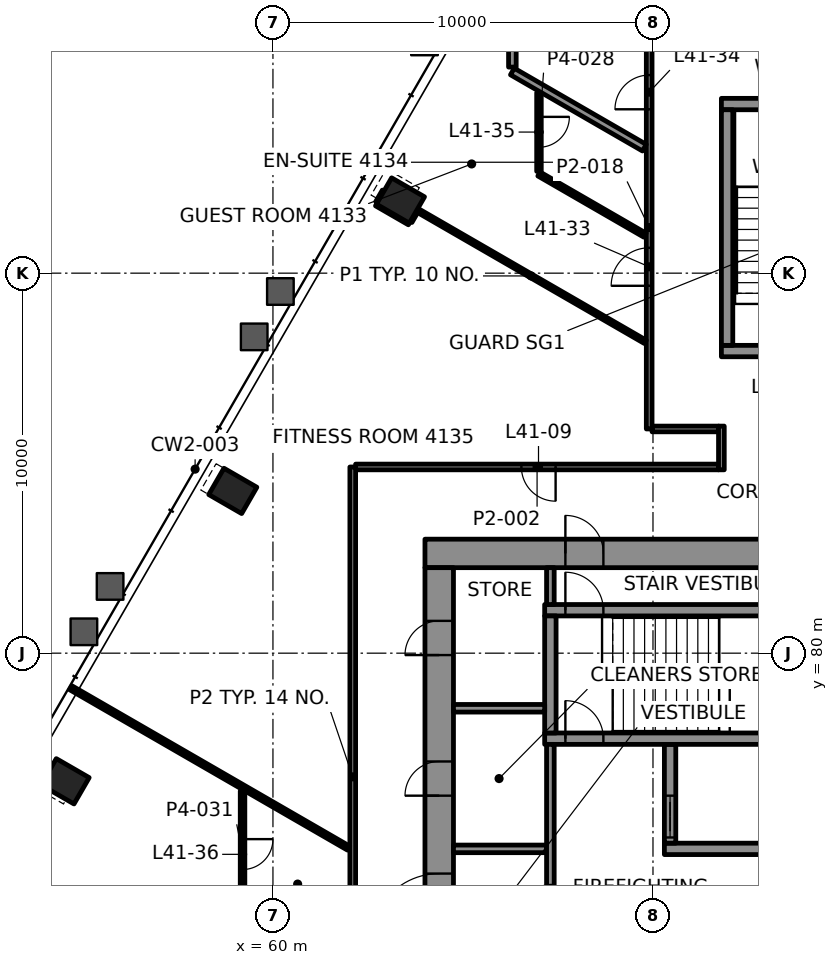
"""IFC4 building model, lengths in metres.
Left out: names, types, materials, properties, quantities, classifications, styles, units other than length and angle.
Written with IfcOpenShell. Run it as: python <this file> out.ifc"""

import sys

from ifc_helpers import new_model, si_unit, direction, frame, frame_2d, origin, origin_2d, place, context, subcontext, project, spatial, rectangle, hollow_rectangle, extrude, element, fill, save


model = new_model("IFC4")
c1 = context("Model", 3, precision=1e-05, world=origin(), true_north=direction((0.0, 1.0)))
c2 = subcontext(c1, "Body", "Model", "MODEL_VIEW")
j1 = project(units=[si_unit("LENGTHUNIT", "METRE"), si_unit("PLANEANGLEUNIT", "RADIAN")], contexts=[c1])
p1 = place(None, origin())
s1 = spatial("IfcSite", under=j1, at=p1, CompositionType="ELEMENT")
p2 = place(p1, origin())
s2 = spatial("IfcBuilding", under=s1, at=p2, CompositionType="ELEMENT")
p3 = place(p2, frame((0.0, 0.0, 179.2)))
s3 = spatial("IfcBuildingStorey", under=s2, at=p3, CompositionType="ELEMENT", Elevation=179.2)
for number, where, z_axis, x_axis in (
    (1, (63.355, 91.912, -0.0), (0.0, 0.0, 1.0), (-0.5, -0.866, 0.0)),
    (2, (58.944, 84.27, -0.0), (0.0, 0.0, 1.0), (-0.5, -0.866, 0.0)),
    (3, (54.532, 76.628, -0.0), (0.0, 0.0, 1.0), (-0.5, -0.866, 0.0)),
):
    element("IfcColumn", number, at=place(p3, frame(where, z_axis=z_axis, x_axis=x_axis)), inside=s3, PredefinedType="COLUMN", context=c2, shape_type="SweptSolid", body=[
        extrude(hollow_rectangle(XDim=0.8, YDim=1.0, WallThickness=0.05, at=origin_2d()), origin(), (0.0, 0.0, 1.0), 3.9),
    ])
p4 = place(p3, frame((64.0, 82.625, 0.0), z_axis=(0.0, 0.0, 1.0), x_axis=(1.0, 0.0, 0.0)))
e4 = element("IfcWall", 4, at=p4, inside=s3, PredefinedType="SHEAR", context=c2, shape_type="SweptSolid", body=[
    extrude(rectangle(XDim=22.0, YDim=0.75, at=frame_2d((11.0, 0.0))), origin(), (0.0, 0.0, 1.0), 3.7),
])
p5 = place(p4, frame((3.695, 0.0, 0.0)))
e5 = element("IfcOpeningElement", 5, at=p5, cuts=e4, PredefinedType="OPENING", context=c2, shape_type="SweptSolid", body=[
    extrude(rectangle(XDim=1.0, YDim=2.1, at=frame_2d((0.5, 1.05))), frame((0.0, 0.385, 0.0), z_axis=(0.0, -1.0, 0.0), x_axis=(1.0, 0.0, 0.0)), (0.0, 0.0, 1.0), 0.77),
])
p6 = place(p4, frame((17.505, 0.0, 0.0)))
e6 = element("IfcOpeningElement", 6, at=p6, cuts=e4, PredefinedType="OPENING", context=c2, shape_type="SweptSolid", body=[
    extrude(rectangle(XDim=1.0, YDim=2.1, at=frame_2d((0.5, 1.05))), frame((0.0, 0.385, 0.0), z_axis=(0.0, -1.0, 0.0), x_axis=(1.0, 0.0, 0.0)), (0.0, 0.0, 1.0), 0.77),
])
p7 = place(p4, frame((10.65, 0.0, 0.0)))
e7 = element("IfcOpeningElement", 7, at=p7, cuts=e4, PredefinedType="OPENING", context=c2, shape_type="SweptSolid", body=[
    extrude(rectangle(XDim=0.9, YDim=2.1, at=frame_2d((0.45, 1.05))), frame((0.0, 0.385, 0.0), z_axis=(0.0, -1.0, 0.0), x_axis=(1.0, 0.0, 0.0)), (0.0, 0.0, 1.0), 0.77),
])
p8 = place(p3, frame((64.375, 67.75, 0.0), z_axis=(0.0, 0.0, 1.0), x_axis=(0.0, 1.0, 0.0)))
e8 = element("IfcWall", 8, at=p8, inside=s3, PredefinedType="SHEAR", context=c2, shape_type="SweptSolid", body=[
    extrude(rectangle(XDim=14.5, YDim=0.75, at=frame_2d((7.25, 0.0))), origin(), (0.0, 0.0, 1.0), 3.7),
])
p9 = place(p8, frame((4.65, 0.0, 0.0)))
e9 = element("IfcOpeningElement", 9, at=p9, cuts=e8, PredefinedType="OPENING", context=c2, shape_type="SweptSolid", body=[
    extrude(rectangle(XDim=1.8, YDim=2.1, at=frame_2d((0.9, 1.05))), frame((0.0, 0.385, 0.0), z_axis=(0.0, -1.0, 0.0), x_axis=(1.0, 0.0, 0.0)), (0.0, 0.0, 1.0), 0.77),
])
p10 = place(p8, frame((8.5, 0.0, 0.0)))
e10 = element("IfcOpeningElement", 10, at=p10, cuts=e8, PredefinedType="OPENING", context=c2, shape_type="SweptSolid", body=[
    extrude(rectangle(XDim=0.9, YDim=2.1, at=frame_2d((0.45, 1.05))), frame((0.0, 0.385, 0.0), z_axis=(0.0, -1.0, 0.0), x_axis=(1.0, 0.0, 0.0)), (0.0, 0.0, 1.0), 0.77),
])
p11 = place(p8, frame((12.2, 0.0, 0.0)))
e11 = element("IfcOpeningElement", 11, at=p11, cuts=e8, PredefinedType="OPENING", context=c2, shape_type="SweptSolid", body=[
    extrude(rectangle(XDim=0.9, YDim=2.1, at=frame_2d((0.45, 1.05))), frame((0.0, 0.385, 0.0), z_axis=(0.0, -1.0, 0.0), x_axis=(1.0, 0.0, 0.0)), (0.0, 0.0, 1.0), 0.77),
])
p12 = place(p3, frame((70.3, 74.85, 0.0), z_axis=(0.0, 0.0, 1.0), x_axis=(1.0, 0.0, 0.0)))
e12 = element("IfcWall", 12, at=p12, inside=s3, PredefinedType="SHEAR", context=c2, shape_type="SweptSolid", body=[
    extrude(rectangle(XDim=14.3, YDim=0.3, at=frame_2d((7.15, 0.0))), origin(), (0.0, 0.0, 1.0), 3.7),
])
p13 = place(p12, frame((3.8, 0.0, 0.0)))
e13 = element("IfcOpeningElement", 13, at=p13, cuts=e12, PredefinedType="OPENING", context=c2, shape_type="SweptSolid", body=[
    extrude(rectangle(XDim=1.1, YDim=2.1, at=frame_2d((0.55, 1.05))), frame((0.0, 0.16, 0.0), z_axis=(0.0, -1.0, 0.0), x_axis=(1.0, 0.0, 0.0)), (0.0, 0.0, 1.0), 0.32),
])
p14 = place(p12, frame((12.2, 0.0, 0.0)))
e14 = element("IfcOpeningElement", 14, at=p14, cuts=e12, PredefinedType="OPENING", context=c2, shape_type="SweptSolid", body=[
    extrude(rectangle(XDim=1.1, YDim=2.1, at=frame_2d((0.55, 1.05))), frame((0.0, 0.16, 0.0), z_axis=(0.0, -1.0, 0.0), x_axis=(1.0, 0.0, 0.0)), (0.0, 0.0, 1.0), 0.32),
])
p15 = place(p3, frame((70.45, 75.0, 0.0), z_axis=(0.0, 0.0, 1.0), x_axis=(0.0, 1.0, 0.0)))
e15 = element("IfcWall", 15, at=p15, inside=s3, PredefinedType="SHEAR", context=c2, shape_type="SweptSolid", body=[
    extrude(rectangle(XDim=2.6, YDim=0.3, at=frame_2d((1.3, 0.0))), origin(), (0.0, 0.0, 1.0), 3.7),
])
p16 = place(p15, frame((0.15, 0.0, 0.0)))
e16 = element("IfcOpeningElement", 16, at=p16, cuts=e15, PredefinedType="OPENING", context=c2, shape_type="SweptSolid", body=[
    extrude(rectangle(XDim=1.1, YDim=2.1, at=frame_2d((0.55, 1.05))), frame((0.0, 0.16, 0.0), z_axis=(0.0, -1.0, 0.0), x_axis=(1.0, 0.0, 0.0)), (0.0, 0.0, 1.0), 0.32),
])
p17 = place(p3, frame((67.15, 77.75, 0.0), z_axis=(0.0, 0.0, 1.0), x_axis=(1.0, 0.0, 0.0)))
e17 = element("IfcWall", 17, at=p17, inside=s3, PredefinedType="SHEAR", context=c2, shape_type="SweptSolid", body=[
    extrude(rectangle(XDim=17.45, YDim=0.3, at=frame_2d((8.725, 0.0))), origin(), (0.0, 0.0, 1.0), 3.7),
])
p18 = place(p17, frame((0.545, 0.0, 0.0)))
e18 = element("IfcOpeningElement", 18, at=p18, cuts=e17, PredefinedType="OPENING", context=c2, shape_type="SweptSolid", body=[
    extrude(rectangle(XDim=1.0, YDim=2.1, at=frame_2d((0.5, 1.05))), frame((0.0, 0.16, 0.0), z_axis=(0.0, -1.0, 0.0), x_axis=(1.0, 0.0, 0.0)), (0.0, 0.0, 1.0), 0.32),
])
p19 = place(p3, frame((67.15, 81.13, 0.0), z_axis=(0.0, 0.0, 1.0), x_axis=(1.0, 0.0, 0.0)))
e19 = element("IfcWall", 19, at=p19, inside=s3, PredefinedType="SHEAR", context=c2, shape_type="SweptSolid", body=[
    extrude(rectangle(XDim=6.91, YDim=0.3, at=frame_2d((3.455, 0.0))), origin(), (0.0, 0.0, 1.0), 3.7),
])
p20 = place(p19, frame((0.545, 0.0, 0.0)))
e20 = element("IfcOpeningElement", 20, at=p20, cuts=e19, PredefinedType="OPENING", context=c2, shape_type="SweptSolid", body=[
    extrude(rectangle(XDim=1.0, YDim=2.1, at=frame_2d((0.5, 1.05))), frame((0.0, 0.16, 0.0), z_axis=(0.0, -1.0, 0.0), x_axis=(1.0, 0.0, 0.0)), (0.0, 0.0, 1.0), 0.32),
])
p21 = place(p3, frame((67.3, 77.9, 0.0), z_axis=(0.0, 0.0, 1.0), x_axis=(0.0, 1.0, 0.0)))
e21 = element("IfcWall", 21, at=p21, inside=s3, PredefinedType="SHEAR", context=c2, shape_type="SweptSolid", body=[
    extrude(rectangle(XDim=3.08, YDim=0.3, at=frame_2d((1.54, 0.0))), origin(), (0.0, 0.0, 1.0), 3.7),
])
p22 = place(p3, frame((71.8, 87.95, 0.0), z_axis=(0.0, 0.0, 1.0), x_axis=(1.0, 0.0, 0.0)))
e22 = element("IfcWall", 22, at=p22, inside=s3, PredefinedType="SHEAR", context=c2, shape_type="SweptSolid", body=[
    extrude(rectangle(XDim=6.4, YDim=0.3, at=frame_2d((3.2, 0.0))), origin(), (0.0, 0.0, 1.0), 3.7),
])
p23 = place(p22, frame((1.325, 0.0, 0.0)))
e23 = element("IfcOpeningElement", 23, at=p23, cuts=e22, PredefinedType="OPENING", context=c2, shape_type="SweptSolid", body=[
    extrude(rectangle(XDim=1.0, YDim=2.1, at=frame_2d((0.5, 1.05))), frame((0.0, 0.16, 0.0), z_axis=(0.0, -1.0, 0.0), x_axis=(1.0, 0.0, 0.0)), (0.0, 0.0, 1.0), 0.32),
])
p24 = place(p22, frame((4.125, 0.0, 0.0)))
e24 = element("IfcOpeningElement", 24, at=p24, cuts=e22, PredefinedType="OPENING", context=c2, shape_type="SweptSolid", body=[
    extrude(rectangle(XDim=1.2, YDim=2.1, at=frame_2d((0.6, 1.05))), frame((0.0, 0.16, 0.0), z_axis=(0.0, -1.0, 0.0), x_axis=(1.0, 0.0, 0.0)), (0.0, 0.0, 1.0), 0.32),
])
p25 = place(p3, frame((71.8, 94.45, 0.0), z_axis=(0.0, 0.0, 1.0), x_axis=(1.0, 0.0, 0.0)))
e25 = element("IfcWall", 25, at=p25, inside=s3, PredefinedType="SHEAR", context=c2, shape_type="SweptSolid", body=[
    extrude(rectangle(XDim=6.4, YDim=0.3, at=frame_2d((3.2, 0.0))), origin(), (0.0, 0.0, 1.0), 3.7),
])
p26 = place(p3, frame((71.95, 88.1, 0.0), z_axis=(0.0, 0.0, 1.0), x_axis=(0.0, 1.0, 0.0)))
e26 = element("IfcWall", 26, at=p26, inside=s3, PredefinedType="SHEAR", context=c2, shape_type="SweptSolid", body=[
    extrude(rectangle(XDim=6.2, YDim=0.3, at=frame_2d((3.1, 0.0))), origin(), (0.0, 0.0, 1.0), 3.7),
])
p27 = place(p3, frame((71.725, 84.9, 0.0), z_axis=(0.0, 0.0, 1.0), x_axis=(-1.0, 0.0, 0.0)))
e27 = element("IfcWall", 27, at=p27, inside=s3, PredefinedType="PARTITIONING", context=c2, shape_type="SweptSolid", body=[
    extrude(rectangle(XDim=9.55, YDim=0.15, at=frame_2d((4.775, 0.0))), origin(), (0.0, 0.0, 1.0), 3.1),
])
p28 = place(p27, frame((4.287, 0.0, 0.0)))
e28 = element("IfcOpeningElement", 28, at=p28, cuts=e27, PredefinedType="OPENING", context=c2, shape_type="SweptSolid", body=[
    extrude(rectangle(XDim=0.9, YDim=2.1, at=frame_2d((0.45, 1.05))), frame((0.0, 0.085, 0.0), z_axis=(0.0, -1.0, 0.0), x_axis=(1.0, 0.0, 0.0)), (0.0, 0.0, 1.0), 0.17),
])
p29 = place(p3, frame((69.976, 85.9, 0.0), z_axis=(0.0, 0.0, 1.0), x_axis=(1.0, 0.0, 0.0)))
e29 = element("IfcWall", 29, at=p29, inside=s3, PredefinedType="PARTITIONING", context=c2, shape_type="SweptSolid", body=[
    extrude(rectangle(XDim=1.75, YDim=0.15, at=frame_2d((0.875, 0.0))), origin(), (0.0, 0.0, 1.0), 3.1),
])
p30 = place(p3, frame((63.614, 91.359, 0.0), z_axis=(0.0, 0.0, 1.0), x_axis=(0.499557828523, 0.866280541142, 0.0)))
e30 = element("IfcWall", 30, at=p30, inside=s3, PredefinedType="PARTITIONING", context=c2, shape_type="SweptSolid", body=[
    extrude(rectangle(XDim=0.3, YDim=0.1, at=frame_2d((0.15, 0.0))), origin(), (0.0, 0.0, 1.0), 3.022),
])
p31 = place(p3, frame((62.748, 91.859, 0.0), z_axis=(0.0, 0.0, 1.0), x_axis=(0.500044870432, 0.865999496279, 0.0)))
e31 = element("IfcWall", 31, at=p31, inside=s3, PredefinedType="PARTITIONING", context=c2, shape_type="SweptSolid", body=[
    extrude(rectangle(XDim=0.35, YDim=0.1, at=frame_2d((0.175, 0.0))), origin(), (0.0, 0.0, 1.0), 3.1),
])
p32 = place(p3, frame((71.8, 84.825, 0.0), z_axis=(0.0, 0.0, 1.0), x_axis=(0.0, 1.0, 0.0)))
e32 = element("IfcWall", 32, at=p32, inside=s3, PredefinedType="PARTITIONING", context=c2, shape_type="SweptSolid", body=[
    extrude(rectangle(XDim=1.15, YDim=0.15, at=frame_2d((0.575, 0.0))), origin(), (0.0, 0.0, 1.0), 3.1),
])
p33 = place(p3, frame((69.9, 85.9, 0.0), z_axis=(0.0, 0.0, 1.0), x_axis=(0.0, 1.0, 0.0)))
e33 = element("IfcWall", 33, at=p33, inside=s3, PredefinedType="PARTITIONING", context=c2, shape_type="SweptSolid", body=[
    extrude(rectangle(XDim=10.6, YDim=0.15, at=frame_2d((5.3, 0.0))), origin(), (0.0, 0.0, 1.0), 3.022),
])
p34 = place(p33, frame((3.767, 0.0, 0.0)))
e34 = element("IfcOpeningElement", 34, at=p34, cuts=e33, PredefinedType="OPENING", context=c2, shape_type="SweptSolid", body=[
    extrude(rectangle(XDim=1.0, YDim=2.1, at=frame_2d((0.5, 1.05))), frame((0.0, 0.085, 0.0), z_axis=(0.0, -1.0, 0.0), x_axis=(1.0, 0.0, 0.0)), (0.0, 0.0, 1.0), 0.17),
])
p35 = place(p33, frame((8.412, 0.0, 0.0)))
e35 = element("IfcOpeningElement", 35, at=p35, cuts=e33, PredefinedType="OPENING", context=c2, shape_type="SweptSolid", body=[
    extrude(rectangle(XDim=0.9, YDim=2.1, at=frame_2d((0.45, 1.05))), frame((0.0, 0.085, 0.0), z_axis=(0.0, -1.0, 0.0), x_axis=(1.0, 0.0, 0.0)), (0.0, 0.0, 1.0), 0.17),
])
p36 = place(p3, frame((67.0, 94.747, 0.0), z_axis=(0.0, 0.0, 1.0), x_axis=(0.0, -1.0, 0.0)))
e36 = element("IfcWall", 36, at=p36, inside=s3, PredefinedType="PARTITIONING", context=c2, shape_type="SweptSolid", body=[
    extrude(rectangle(XDim=2.068, YDim=0.12, at=frame_2d((1.034, 0.0))), origin(), (0.0, 0.0, 1.0), 3.1),
])
p37 = place(p36, frame((0.634, 0.0, 0.0)))
e37 = element("IfcOpeningElement", 37, at=p37, cuts=e36, PredefinedType="OPENING", context=c2, shape_type="SweptSolid", body=[
    extrude(rectangle(XDim=0.8, YDim=2.1, at=frame_2d((0.4, 1.05))), frame((0.0, 0.07, 0.0), z_axis=(0.0, -1.0, 0.0), x_axis=(1.0, 0.0, 0.0)), (0.0, 0.0, 1.0), 0.14),
])
p38 = place(p3, frame((66.3, 95.423, 0.0), z_axis=(0.0, 0.0, 1.0), x_axis=(0.0, 1.0, 0.0)))
e38 = element("IfcWall", 38, at=p38, inside=s3, PredefinedType="PARTITIONING", context=c2, shape_type="SweptSolid", body=[
    extrude(rectangle(XDim=3.789, YDim=0.2, at=frame_2d((1.895, 0.0))), origin(), (0.0, 0.0, 1.0), 3.022),
])
p39 = place(p3, frame((62.1, 68.591, 0.0), z_axis=(0.0, 0.0, 1.0), x_axis=(0.0, 1.0, 0.0)))
e39 = element("IfcWall", 39, at=p39, inside=s3, PredefinedType="PARTITIONING", context=c2, shape_type="SweptSolid", body=[
    extrude(rectangle(XDim=16.308, YDim=0.15, at=frame_2d((8.154, 0.0))), origin(), (0.0, 0.0, 1.0), 3.1),
])
p40 = place(p3, frame((59.2, 76.371, 0.0), z_axis=(0.0, 0.0, 1.0), x_axis=(0.0, -1.0, 0.0)))
e40 = element("IfcWall", 40, at=p40, inside=s3, PredefinedType="PARTITIONING", context=c2, shape_type="SweptSolid", body=[
    extrude(rectangle(XDim=3.329, YDim=0.12, at=frame_2d((1.665, 0.0))), origin(), (0.0, 0.0, 1.0), 3.1),
])
p41 = place(p40, frame((1.265, 0.0, 0.0)))
e41 = element("IfcOpeningElement", 41, at=p41, cuts=e40, PredefinedType="OPENING", context=c2, shape_type="SweptSolid", body=[
    extrude(rectangle(XDim=0.8, YDim=2.1, at=frame_2d((0.4, 1.05))), frame((0.0, 0.07, 0.0), z_axis=(0.0, -1.0, 0.0), x_axis=(1.0, 0.0, 0.0)), (0.0, 0.0, 1.0), 0.14),
])
p42 = place(p3, frame((69.773, 93.302, 0.0), z_axis=(0.0, 0.0, 1.0), x_axis=(-0.866046692957, 0.499963124258, 0.0)))
e42 = element("IfcWall", 42, at=p42, inside=s3, PredefinedType="PARTITIONING", context=c2, shape_type="SweptSolid", body=[
    extrude(rectangle(XDim=4.01, YDim=0.2, at=frame_2d((2.005, 0.0))), origin(), (0.0, 0.0, 1.0), 3.1),
])
p43 = place(p3, frame((69.79, 90.998, 0.0), z_axis=(0.0, 0.0, 1.0), x_axis=(-0.866029130051, 0.499993545862, 0.0)))
e43 = element("IfcWall", 43, at=p43, inside=s3, PredefinedType="PARTITIONING", context=c2, shape_type="SweptSolid", body=[
    extrude(rectangle(XDim=3.222, YDim=0.12, at=frame_2d((1.611, 0.0))), origin(), (0.0, 0.0, 1.0), 3.1),
])
p44 = place(p3, frame((69.799, 88.192, 0.0), z_axis=(0.0, 0.0, 1.0), x_axis=(-0.866013353477, 0.500020871164, 0.0)))
e44 = element("IfcWall", 44, at=p44, inside=s3, PredefinedType="PARTITIONING", context=c2, shape_type="SweptSolid", body=[
    extrude(rectangle(XDim=6.94, YDim=0.1, at=frame_2d((3.47, 0.0))), origin(), (0.0, 0.0, 1.0), 3.022),
])
p45 = place(p3, frame((63.588, 91.316, 0.0), z_axis=(0.0, 0.0, 1.0), x_axis=(-0.866039090965, 0.499976292358, 0.0)))
e45 = element("IfcWall", 45, at=p45, inside=s3, PredefinedType="PARTITIONING", context=c2, shape_type="SweptSolid", body=[
    extrude(rectangle(XDim=0.999, YDim=0.1, at=frame_2d((0.5, 0.0))), origin(), (0.0, 0.0, 1.0), 3.022),
])
p46 = place(p3, frame((61.99, 74.869, 0.0), z_axis=(0.0, 0.0, 1.0), x_axis=(-0.866017924271, 0.500012954673, 0.0)))
e46 = element("IfcWall", 46, at=p46, inside=s3, PredefinedType="PARTITIONING", context=c2, shape_type="SweptSolid", body=[
    extrude(rectangle(XDim=8.439, YDim=0.12, at=frame_2d((4.219, 0.0))), origin(), (0.0, 0.0, 1.0), 3.022),
])
p47 = place(p3, frame((64.75, 74.85, 0.0), z_axis=(0.0, 0.0, 1.0), x_axis=(1.0, 0.0, 0.0)))
e47 = element("IfcWall", 47, at=p47, inside=s3, PredefinedType="PARTITIONING", context=c2, shape_type="SweptSolid", body=[
    extrude(rectangle(XDim=2.45, YDim=0.2, at=frame_2d((1.225, 0.0))), origin(), (0.0, 0.0, 1.0), 3.7),
])
p48 = place(p3, frame((64.75, 78.55, 0.0), z_axis=(0.0, 0.0, 1.0), x_axis=(1.0, 0.0, 0.0)))
e48 = element("IfcWall", 48, at=p48, inside=s3, PredefinedType="PARTITIONING", context=c2, shape_type="SweptSolid", body=[
    extrude(rectangle(XDim=2.4, YDim=0.2, at=frame_2d((1.2, 0.0))), origin(), (0.0, 0.0, 1.0), 3.7),
])
p49 = place(p3, frame((67.3, 71.85, 0.0), z_axis=(0.0, 0.0, 1.0), x_axis=(0.0, 1.0, 0.0)))
e49 = element("IfcWall", 49, at=p49, inside=s3, PredefinedType="PARTITIONING", context=c2, shape_type="SweptSolid", body=[
    extrude(rectangle(XDim=5.75, YDim=0.2, at=frame_2d((2.875, 0.0))), origin(), (0.0, 0.0, 1.0), 3.7),
])
p50 = place(p49, frame((0.85, 0.0, 0.0)))
e50 = element("IfcOpeningElement", 50, at=p50, cuts=e49, PredefinedType="OPENING", context=c2, shape_type="SweptSolid", body=[
    extrude(rectangle(XDim=1.2, YDim=2.1, at=frame_2d((0.6, 1.05))), frame((0.0, 0.11, 0.0), z_axis=(0.0, -1.0, 0.0), x_axis=(1.0, 0.0, 0.0)), (0.0, 0.0, 1.0), 0.22),
])
p51 = place(p3, frame((67.3, 81.28, 0.0), z_axis=(0.0, 0.0, 1.0), x_axis=(0.0, 1.0, 0.0)))
e51 = element("IfcWall", 51, at=p51, inside=s3, PredefinedType="PARTITIONING", context=c2, shape_type="SweptSolid", body=[
    extrude(rectangle(XDim=0.97, YDim=0.2, at=frame_2d((0.485, 0.0))), origin(), (0.0, 0.0, 1.0), 3.7),
])
p52 = place(p28, origin())
e52 = element("IfcDoor", 52, at=p52, inside=s3, OperationType="SINGLE_SWING_LEFT", PredefinedType="DOOR", context=c2, shape_type="SweptSolid", body=[
    extrude(rectangle(XDim=0.9, YDim=2.1, at=frame_2d((0.45, 1.05))), frame((0.0, 0.025, 0.0), z_axis=(0.0, -1.0, 0.0), x_axis=(1.0, 0.0, 0.0)), (0.0, 0.0, 1.0), 0.05),
])
fill(e28, e52)
p53 = place(p34, origin())
e53 = element("IfcDoor", 53, at=p53, inside=s3, OperationType="SINGLE_SWING_RIGHT", PredefinedType="DOOR", context=c2, shape_type="SweptSolid", body=[
    extrude(rectangle(XDim=1.0, YDim=2.1, at=frame_2d((0.5, 1.05))), frame((0.0, 0.025, 0.0), z_axis=(0.0, -1.0, 0.0), x_axis=(1.0, 0.0, 0.0)), (0.0, 0.0, 1.0), 0.05),
])
fill(e34, e53)
p54 = place(p35, origin())
e54 = element("IfcDoor", 54, at=p54, inside=s3, OperationType="SINGLE_SWING_LEFT", PredefinedType="DOOR", context=c2, shape_type="SweptSolid", body=[
    extrude(rectangle(XDim=0.9, YDim=2.1, at=frame_2d((0.45, 1.05))), frame((0.0, 0.025, 0.0), z_axis=(0.0, -1.0, 0.0), x_axis=(1.0, 0.0, 0.0)), (0.0, 0.0, 1.0), 0.05),
])
fill(e35, e54)
p55 = place(p37, origin())
e55 = element("IfcDoor", 55, at=p55, inside=s3, OperationType="SINGLE_SWING_RIGHT", PredefinedType="DOOR", context=c2, shape_type="SweptSolid", body=[
    extrude(rectangle(XDim=0.8, YDim=2.1, at=frame_2d((0.4, 1.05))), frame((0.0, 0.025, 0.0), z_axis=(0.0, -1.0, 0.0), x_axis=(1.0, 0.0, 0.0)), (0.0, 0.0, 1.0), 0.05),
])
fill(e37, e55)
p56 = place(p41, origin())
e56 = element("IfcDoor", 56, at=p56, inside=s3, OperationType="SINGLE_SWING_LEFT", PredefinedType="DOOR", context=c2, shape_type="SweptSolid", body=[
    extrude(rectangle(XDim=0.8, YDim=2.1, at=frame_2d((0.4, 1.05))), frame((0.0, 0.025, 0.0), z_axis=(0.0, -1.0, 0.0), x_axis=(1.0, 0.0, 0.0)), (0.0, 0.0, 1.0), 0.05),
])
fill(e41, e56)
p57 = place(p16, origin())
e57 = element("IfcDoor", 57, at=p57, inside=s3, OperationType="DOUBLE_DOOR_SLIDING", PredefinedType="DOOR", context=c2, shape_type="SweptSolid", body=[
    extrude(rectangle(XDim=1.1, YDim=2.1, at=frame_2d((0.55, 1.05))), frame((0.0, 0.025, 0.0), z_axis=(0.0, -1.0, 0.0), x_axis=(1.0, 0.0, 0.0)), (0.0, 0.0, 1.0), 0.05),
])
fill(e16, e57)
p58 = place(p18, origin())
e58 = element("IfcDoor", 58, at=p58, inside=s3, OperationType="SINGLE_SWING_LEFT", PredefinedType="DOOR", context=c2, shape_type="SweptSolid", body=[
    extrude(rectangle(XDim=1.0, YDim=2.1, at=frame_2d((0.5, 1.05))), frame((0.0, 0.025, 0.0), z_axis=(0.0, -1.0, 0.0), x_axis=(1.0, 0.0, 0.0)), (0.0, 0.0, 1.0), 0.05),
])
fill(e18, e58)
p59 = place(p20, origin())
e59 = element("IfcDoor", 59, at=p59, inside=s3, OperationType="SINGLE_SWING_RIGHT", PredefinedType="DOOR", context=c2, shape_type="SweptSolid", body=[
    extrude(rectangle(XDim=1.0, YDim=2.1, at=frame_2d((0.5, 1.05))), frame((0.0, 0.025, 0.0), z_axis=(0.0, -1.0, 0.0), x_axis=(1.0, 0.0, 0.0)), (0.0, 0.0, 1.0), 0.05),
])
fill(e20, e59)
p60 = place(p5, origin())
e60 = element("IfcDoor", 60, at=p60, inside=s3, OperationType="SINGLE_SWING_LEFT", PredefinedType="DOOR", context=c2, shape_type="SweptSolid", body=[
    extrude(rectangle(XDim=1.0, YDim=2.1, at=frame_2d((0.5, 1.05))), frame((0.0, 0.095, 0.0), z_axis=(0.0, -1.0, 0.0), x_axis=(1.0, 0.0, 0.0)), (0.0, 0.0, 1.0), 0.19),
])
fill(e5, e60)
p61 = place(p50, origin())
e61 = element("IfcDoor", 61, at=p61, inside=s3, OperationType="SINGLE_SWING_RIGHT", PredefinedType="DOOR", context=c2, shape_type="SweptSolid", body=[
    extrude(rectangle(XDim=1.2, YDim=2.1, at=frame_2d((0.6, 1.05))), frame((0.0, 0.025, 0.0), z_axis=(0.0, -1.0, 0.0), x_axis=(1.0, 0.0, 0.0)), (0.0, 0.0, 1.0), 0.05),
])
fill(e50, e61)
p62 = place(p9, origin())
e62 = element("IfcDoor", 62, at=p62, inside=s3, OperationType="SINGLE_SWING_LEFT", PredefinedType="DOOR", context=c2, shape_type="SweptSolid", body=[
    extrude(rectangle(XDim=1.8, YDim=2.1, at=frame_2d((0.9, 1.05))), frame((0.0, 0.095, 0.0), z_axis=(0.0, -1.0, 0.0), x_axis=(1.0, 0.0, 0.0)), (0.0, 0.0, 1.0), 0.19),
])
fill(e9, e62)
p63 = place(p10, origin())
e63 = element("IfcDoor", 63, at=p63, inside=s3, OperationType="SINGLE_SWING_RIGHT", PredefinedType="DOOR", context=c2, shape_type="SweptSolid", body=[
    extrude(rectangle(XDim=0.9, YDim=2.1, at=frame_2d((0.45, 1.05))), frame((0.0, 0.095, 0.0), z_axis=(0.0, -1.0, 0.0), x_axis=(1.0, 0.0, 0.0)), (0.0, 0.0, 1.0), 0.19),
])
fill(e10, e63)
p64 = place(p11, origin())
e64 = element("IfcDoor", 64, at=p64, inside=s3, OperationType="SINGLE_SWING_LEFT", PredefinedType="DOOR", context=c2, shape_type="SweptSolid", body=[
    extrude(rectangle(XDim=0.9, YDim=2.1, at=frame_2d((0.45, 1.05))), frame((0.0, 0.095, 0.0), z_axis=(0.0, -1.0, 0.0), x_axis=(1.0, 0.0, 0.0)), (0.0, 0.0, 1.0), 0.19),
])
fill(e11, e64)
save(model, sys.argv[1])
